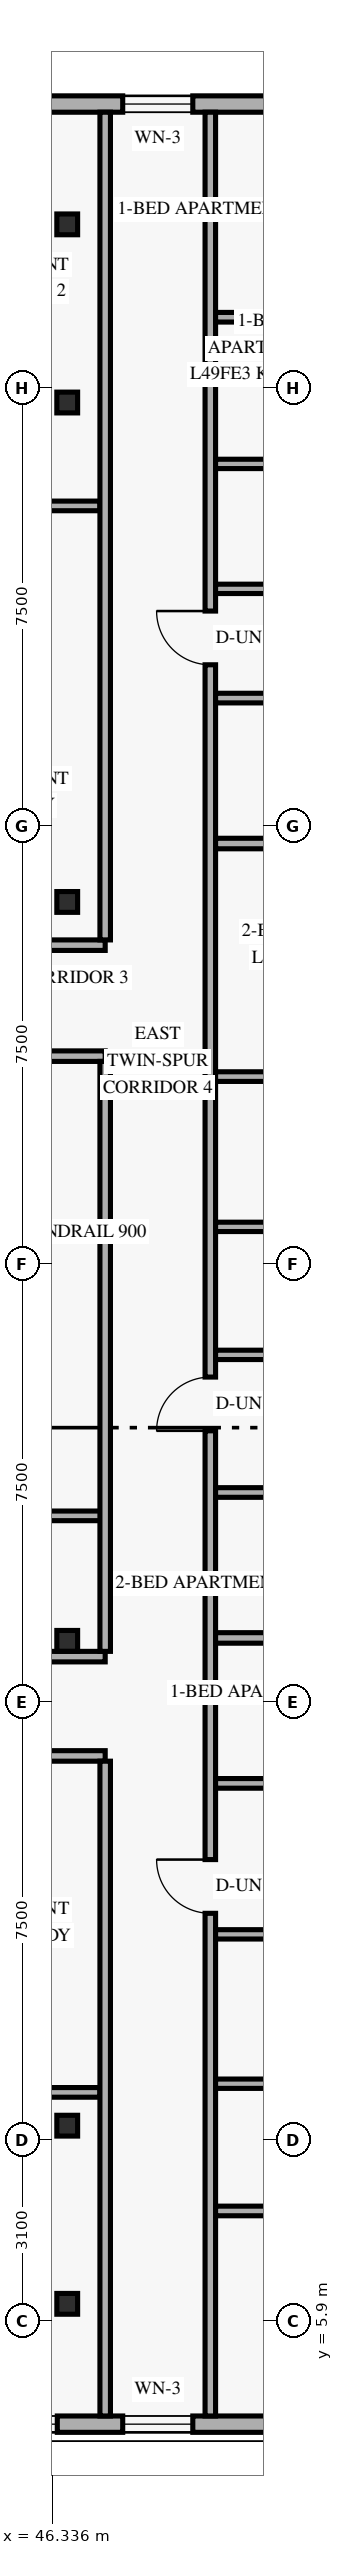
"""IFC4 building model, lengths in metres.
Left out: names, types, materials, properties, quantities, classifications, styles, units other than length and angle.
Written with IfcOpenShell. Run it as: python <this file> out.ifc"""

import sys

from ifc_helpers import new_model, si_unit, direction, frame, frame_2d, origin, origin_2d, place, context, subcontext, project, spatial, rectangle, hollow_rectangle, extrude, element, fill, save


model = new_model("IFC4")
c1 = context("Model", 3, precision=1e-05, world=origin(), true_north=direction((0.0, 1.0)))
c2 = subcontext(c1, "Body", "Model", "MODEL_VIEW")
j1 = project(units=[si_unit("LENGTHUNIT", "METRE"), si_unit("PLANEANGLEUNIT", "RADIAN")], contexts=[c1])
p1 = place(None, origin())
s1 = spatial("IfcSite", under=j1, at=p1, CompositionType="ELEMENT")
p2 = place(p1, origin())
s2 = spatial("IfcBuilding", under=s1, at=p2, CompositionType="ELEMENT")
p3 = place(p2, frame((0.0, 0.0, 188.4)))
s3 = spatial("IfcBuildingStorey", under=s2, at=p3, CompositionType="ELEMENT", Elevation=188.4)
for number, where, z_axis, x_axis in (
    (1, (46.53, 6.2, 0.0), (0.035, 0.0, 0.999), (0.0, 1.0, 0.0)),
    (2, (46.53, 9.25, 0.0), (0.035, 0.0, 0.999), (0.0, 1.0, 0.0)),
    (3, (46.53, 17.55, 0.0), (0.035, 0.0, 0.999), (0.0, 1.0, 0.0)),
    (4, (46.53, 30.2, 0.0), (0.035, 0.0, 0.999), (0.0, 1.0, 0.0)),
    (5, (46.53, 38.75, 0.0), (0.035, 0.0, 0.999), (0.0, 1.0, 0.0)),
    (6, (46.53, 41.8, 0.0), (0.035, 0.0, 0.999), (0.0, 1.0, 0.0)),
):
    element("IfcColumn", number, at=place(p3, frame(where, z_axis=z_axis, x_axis=x_axis)), inside=s3, PredefinedType="COLUMN", context=c2, shape_type="SweptSolid", body=[
        extrude(hollow_rectangle(XDim=0.356, YDim=0.356, WallThickness=0.016, at=origin_2d()), origin(), (0.0, 0.0, 1.0), 3.602),
    ])
p4 = place(p3, frame((34.4, 4.14, 0.0), z_axis=(0.0, 0.0, 1.0), x_axis=(1.0, 0.0, 0.0)))
e7 = element("IfcWall", 7, at=p4, inside=s3, PredefinedType="SOLIDWALL", context=c2, shape_type="SweptSolid", body=[
    extrude(rectangle(XDim=20.58, YDim=0.28, at=frame_2d((10.29, 0.0))), origin(), (0.0, 0.0, 1.0), 3.35),
])
p5 = place(p4, frame((1.535, 0.0, 0.85)))
e8 = element("IfcOpeningElement", 8, at=p5, cuts=e7, PredefinedType="OPENING", context=c2, shape_type="SweptSolid", body=[
    extrude(rectangle(XDim=1.5, YDim=1.55, at=frame_2d((0.75, 0.775))), frame((0.0, 0.15, 0.0), z_axis=(0.0, -1.0, 0.0), x_axis=(1.0, 0.0, 0.0)), (0.0, 0.0, 1.0), 0.3),
])
p6 = place(p4, frame((5.876, 0.0, 0.85)))
e9 = element("IfcOpeningElement", 9, at=p6, cuts=e7, PredefinedType="OPENING", context=c2, shape_type="SweptSolid", body=[
    extrude(rectangle(XDim=1.5, YDim=1.55, at=frame_2d((0.75, 0.775))), frame((0.0, 0.15, 0.0), z_axis=(0.0, -1.0, 0.0), x_axis=(1.0, 0.0, 0.0)), (0.0, 0.0, 1.0), 0.3),
])
p7 = place(p4, frame((10.523, 0.0, 0.85)))
e10 = element("IfcOpeningElement", 10, at=p7, cuts=e7, PredefinedType="OPENING", context=c2, shape_type="SweptSolid", body=[
    extrude(rectangle(XDim=1.5, YDim=1.55, at=frame_2d((0.75, 0.775))), frame((0.0, 0.15, 0.0), z_axis=(0.0, -1.0, 0.0), x_axis=(1.0, 0.0, 0.0)), (0.0, 0.0, 1.0), 0.3),
])
p8 = place(p4, frame((13.143, 0.0, 0.85)))
e11 = element("IfcOpeningElement", 11, at=p8, cuts=e7, PredefinedType="OPENING", context=c2, shape_type="SweptSolid", body=[
    extrude(rectangle(XDim=1.2, YDim=1.5, at=frame_2d((0.6, 0.75))), frame((0.0, 0.15, 0.0), z_axis=(0.0, -1.0, 0.0), x_axis=(1.0, 0.0, 0.0)), (0.0, 0.0, 1.0), 0.3),
])
p9 = place(p4, frame((16.862, 0.0, 0.85)))
e12 = element("IfcOpeningElement", 12, at=p9, cuts=e7, PredefinedType="OPENING", context=c2, shape_type="SweptSolid", body=[
    extrude(rectangle(XDim=1.5, YDim=1.55, at=frame_2d((0.75, 0.775))), frame((0.0, 0.15, 0.0), z_axis=(0.0, -1.0, 0.0), x_axis=(1.0, 0.0, 0.0)), (0.0, 0.0, 1.0), 0.3),
])
p10 = place(p3, frame((54.98, 43.86, 0.0), z_axis=(0.0, 0.0, 1.0), x_axis=(-1.0, 0.0, 0.0)))
e13 = element("IfcWall", 13, at=p10, inside=s3, PredefinedType="SOLIDWALL", context=c2, shape_type="SweptSolid", body=[
    extrude(rectangle(XDim=33.76, YDim=0.28, at=frame_2d((16.88, 0.0))), origin(), (0.0, 0.0, 1.0), 3.35),
])
p11 = place(p10, frame((28.705, 0.0, 0.85)))
e14 = element("IfcOpeningElement", 14, at=p11, cuts=e13, PredefinedType="OPENING", context=c2, shape_type="SweptSolid", body=[
    extrude(rectangle(XDim=1.35, YDim=1.55, at=frame_2d((0.675, 0.775))), frame((0.0, 0.15, 0.0), z_axis=(0.0, -1.0, 0.0), x_axis=(1.0, 0.0, 0.0)), (0.0, 0.0, 1.0), 0.3),
])
p12 = place(p10, frame((21.82, 0.0, 0.85)))
e15 = element("IfcOpeningElement", 15, at=p12, cuts=e13, PredefinedType="OPENING", context=c2, shape_type="SweptSolid", body=[
    extrude(rectangle(XDim=1.35, YDim=1.55, at=frame_2d((0.675, 0.775))), frame((0.0, 0.15, 0.0), z_axis=(0.0, -1.0, 0.0), x_axis=(1.0, 0.0, 0.0)), (0.0, 0.0, 1.0), 0.3),
])
p13 = place(p10, frame((15.043, 0.0, 0.85)))
e16 = element("IfcOpeningElement", 16, at=p13, cuts=e13, PredefinedType="OPENING", context=c2, shape_type="SweptSolid", body=[
    extrude(rectangle(XDim=1.35, YDim=1.55, at=frame_2d((0.675, 0.775))), frame((0.0, 0.15, 0.0), z_axis=(0.0, -1.0, 0.0), x_axis=(1.0, 0.0, 0.0)), (0.0, 0.0, 1.0), 0.3),
])
p14 = place(p10, frame((9.132, 0.0, 0.85)))
e17 = element("IfcOpeningElement", 17, at=p14, cuts=e13, PredefinedType="OPENING", context=c2, shape_type="SweptSolid", body=[
    extrude(rectangle(XDim=1.35, YDim=1.55, at=frame_2d((0.675, 0.775))), frame((0.0, 0.15, 0.0), z_axis=(0.0, -1.0, 0.0), x_axis=(1.0, 0.0, 0.0)), (0.0, 0.0, 1.0), 0.3),
])
p15 = place(p10, frame((6.237, 0.0, 0.85)))
e18 = element("IfcOpeningElement", 18, at=p15, cuts=e13, PredefinedType="OPENING", context=c2, shape_type="SweptSolid", body=[
    extrude(rectangle(XDim=1.2, YDim=1.5, at=frame_2d((0.6, 0.75))), frame((0.0, 0.15, 0.0), z_axis=(0.0, -1.0, 0.0), x_axis=(1.0, 0.0, 0.0)), (0.0, 0.0, 1.0), 0.3),
])
p16 = place(p10, frame((2.293, 0.0, 0.85)))
e19 = element("IfcOpeningElement", 19, at=p16, cuts=e13, PredefinedType="OPENING", context=c2, shape_type="SweptSolid", body=[
    extrude(rectangle(XDim=1.35, YDim=1.55, at=frame_2d((0.675, 0.775))), frame((0.0, 0.15, 0.0), z_axis=(0.0, -1.0, 0.0), x_axis=(1.0, 0.0, 0.0)), (0.0, 0.0, 1.0), 0.3),
])
p17 = place(p3, frame((38.032, 15.58, 0.0), z_axis=(0.0, 0.0, 1.0), x_axis=(1.0, 0.0, 0.0)))
e20 = element("IfcWall", 20, at=p17, inside=s3, PredefinedType="STANDARD", context=c2, shape_type="SweptSolid", body=[
    extrude(rectangle(XDim=9.21, YDim=0.18, at=frame_2d((4.605, 0.0))), origin(), (0.0, 0.0, 1.0), 2.72),
])
p18 = place(p17, frame((0.327, 0.0, 0.0)))
e21 = element("IfcOpeningElement", 21, at=p18, cuts=e20, PredefinedType="OPENING", context=c2, shape_type="SweptSolid", body=[
    extrude(rectangle(XDim=0.92, YDim=2.15, at=frame_2d((0.46, 1.075))), frame((0.0, 0.1, 0.0), z_axis=(0.0, -1.0, 0.0), x_axis=(1.0, 0.0, 0.0)), (0.0, 0.0, 1.0), 0.2),
])
p19 = place(p3, frame((37.64, 17.28, 0.0), z_axis=(0.0, 0.0, 1.0), x_axis=(1.0, 0.0, 0.0)))
e22 = element("IfcWall", 22, at=p19, inside=s3, PredefinedType="STANDARD", context=c2, shape_type="SweptSolid", body=[
    extrude(rectangle(XDim=9.603, YDim=0.18, at=frame_2d((4.802, 0.0))), origin(), (0.0, 0.0, 1.0), 2.72),
])
p20 = place(p19, frame((1.31, 0.0, 0.0)))
e23 = element("IfcOpeningElement", 23, at=p20, cuts=e22, PredefinedType="OPENING", context=c2, shape_type="SweptSolid", body=[
    extrude(rectangle(XDim=0.95, YDim=2.15, at=frame_2d((0.475, 1.075))), frame((0.0, 0.1, 0.0), z_axis=(0.0, -1.0, 0.0), x_axis=(1.0, 0.0, 0.0)), (0.0, 0.0, 1.0), 0.2),
])
p21 = place(p3, frame((45.48, 27.56, 0.0), z_axis=(0.0, 0.0, 1.0), x_axis=(1.0, 0.0, 0.0)))
e24 = element("IfcWall", 24, at=p21, inside=s3, PredefinedType="STANDARD", context=c2, shape_type="SweptSolid", body=[
    extrude(rectangle(XDim=1.763, YDim=0.18, at=frame_2d((0.881, 0.0))), origin(), (0.0, 0.0, 1.0), 2.72),
])
p22 = place(p3, frame((35.51, 29.46, 0.0), z_axis=(0.0, 0.0, 1.0), x_axis=(1.0, 0.0, 0.0)))
e25 = element("IfcWall", 25, at=p22, inside=s3, PredefinedType="STANDARD", context=c2, shape_type="SweptSolid", body=[
    extrude(rectangle(XDim=11.733, YDim=0.18, at=frame_2d((5.866, 0.0))), origin(), (0.0, 0.0, 1.0), 2.72),
])
p23 = place(p22, frame((0.32, 0.0, 0.0)))
e26 = element("IfcOpeningElement", 26, at=p23, cuts=e25, PredefinedType="OPENING", context=c2, shape_type="SweptSolid", body=[
    extrude(rectangle(XDim=0.92, YDim=2.15, at=frame_2d((0.46, 1.075))), frame((0.0, 0.1, 0.0), z_axis=(0.0, -1.0, 0.0), x_axis=(1.0, 0.0, 0.0)), (0.0, 0.0, 1.0), 0.2),
])
p24 = place(p3, frame((44.183, 9.82, 0.0), z_axis=(0.0, 0.0, 1.0), x_axis=(1.0, 0.0, 0.0)))
e27 = element("IfcWall", 27, at=p24, inside=s3, PredefinedType="PARTITIONING", context=c2, shape_type="SweptSolid", body=[
    extrude(rectangle(XDim=2.97, YDim=0.165, at=frame_2d((1.485, 0.0))), origin(), (0.0, 0.0, 1.0), 2.72),
])
p25 = place(p3, frame((43.183, 36.98, 0.0), z_axis=(0.0, 0.0, 1.0), x_axis=(1.0, 0.0, 0.0)))
e28 = element("IfcWall", 28, at=p25, inside=s3, PredefinedType="PARTITIONING", context=c2, shape_type="SweptSolid", body=[
    extrude(rectangle(XDim=3.97, YDim=0.165, at=frame_2d((1.985, 0.0))), origin(), (0.0, 0.0, 1.0), 2.72),
])
p26 = place(p3, frame((45.48, 19.69, 0.0), z_axis=(0.0, 0.0, 1.0), x_axis=(1.0, 0.0, 0.0)))
e29 = element("IfcWall", 29, at=p26, inside=s3, PredefinedType="PARTITIONING", context=c2, shape_type="SweptSolid", body=[
    extrude(rectangle(XDim=1.763, YDim=0.165, at=frame_2d((0.881, 0.0))), origin(), (0.0, 0.0, 1.0), 2.72),
])
p27 = place(p3, frame((49.043, 4.28, 0.0), z_axis=(0.0, 0.0, 1.0), x_axis=(0.0, 1.0, 0.0)))
e30 = element("IfcWall", 30, at=p27, inside=s3, PredefinedType="STANDARD", context=c2, shape_type="SweptSolid", body=[
    extrude(rectangle(XDim=39.44, YDim=0.18, at=frame_2d((19.72, 0.0))), origin(), (0.0, 0.0, 1.0), 2.72),
])
p28 = place(p27, frame((8.605, 0.0, 0.0)))
e31 = element("IfcOpeningElement", 31, at=p28, cuts=e30, PredefinedType="OPENING", context=c2, shape_type="SweptSolid", body=[
    extrude(rectangle(XDim=0.92, YDim=2.15, at=frame_2d((0.46, 1.075))), frame((0.0, 0.1, 0.0), z_axis=(0.0, -1.0, 0.0), x_axis=(1.0, 0.0, 0.0)), (0.0, 0.0, 1.0), 0.2),
])
p29 = place(p27, frame((16.866, 0.0, 0.0)))
e32 = element("IfcOpeningElement", 32, at=p29, cuts=e30, PredefinedType="OPENING", context=c2, shape_type="SweptSolid", body=[
    extrude(rectangle(XDim=0.92, YDim=2.15, at=frame_2d((0.46, 1.075))), frame((0.0, 0.1, 0.0), z_axis=(0.0, -1.0, 0.0), x_axis=(1.0, 0.0, 0.0)), (0.0, 0.0, 1.0), 0.2),
])
p30 = place(p27, frame((29.98, 0.0, 0.0)))
e33 = element("IfcOpeningElement", 33, at=p30, cuts=e30, PredefinedType="OPENING", context=c2, shape_type="SweptSolid", body=[
    extrude(rectangle(XDim=0.92, YDim=2.15, at=frame_2d((0.46, 1.075))), frame((0.0, 0.1, 0.0), z_axis=(0.0, -1.0, 0.0), x_axis=(1.0, 0.0, 0.0)), (0.0, 0.0, 1.0), 0.2),
])
p31 = place(p3, frame((47.243, 4.28, 0.0), z_axis=(0.0, 0.0, 1.0), x_axis=(0.0, 1.0, 0.0)))
e34 = element("IfcWall", 34, at=p31, inside=s3, PredefinedType="STANDARD", context=c2, shape_type="SweptSolid", body=[
    extrude(rectangle(XDim=11.21, YDim=0.18, at=frame_2d((5.605, 0.0))), origin(), (0.0, 0.0, 1.0), 2.72),
])
p32 = place(p3, frame((47.243, 17.37, 0.0), z_axis=(0.0, 0.0, 1.0), x_axis=(0.0, 1.0, 0.0)))
e35 = element("IfcWall", 35, at=p32, inside=s3, PredefinedType="STANDARD", context=c2, shape_type="SweptSolid", body=[
    extrude(rectangle(XDim=10.1, YDim=0.18, at=frame_2d((5.05, 0.0))), origin(), (0.0, 0.0, 1.0), 2.72),
])
p33 = place(p3, frame((47.243, 29.55, 0.0), z_axis=(0.0, 0.0, 1.0), x_axis=(0.0, 1.0, 0.0)))
e36 = element("IfcWall", 36, at=p33, inside=s3, PredefinedType="STANDARD", context=c2, shape_type="SweptSolid", body=[
    extrude(rectangle(XDim=14.17, YDim=0.18, at=frame_2d((7.085, 0.0))), origin(), (0.0, 0.0, 1.0), 2.72),
])
p34 = place(p3, frame((49.133, 7.79, 0.0), z_axis=(0.0, 0.0, 1.0), x_axis=(1.0, 0.0, 0.0)))
e37 = element("IfcWall", 37, at=p34, inside=s3, PredefinedType="PARTITIONING", context=c2, shape_type="SweptSolid", body=[
    extrude(rectangle(XDim=9.187, YDim=0.165, at=frame_2d((4.594, 0.0))), origin(), (0.0, 0.0, 1.0), 2.869),
])
p35 = place(p34, frame((5.653, 0.0, 0.0)))
e38 = element("IfcOpeningElement", 38, at=p35, cuts=e37, PredefinedType="OPENING", context=c2, shape_type="SweptSolid", body=[
    extrude(rectangle(XDim=0.9, YDim=2.14, at=frame_2d((0.45, 1.07))), frame((0.0, 0.093, 0.0), z_axis=(0.0, -1.0, 0.0), x_axis=(1.0, 0.0, 0.0)), (0.0, 0.0, 1.0), 0.185),
])
p36 = place(p3, frame((49.133, 12.525, 0.0), z_axis=(0.0, 0.0, 1.0), x_axis=(1.0, 0.0, 0.0)))
e39 = element("IfcWall", 39, at=p36, inside=s3, PredefinedType="PLUMBINGWALL", context=c2, shape_type="SweptSolid", body=[
    extrude(rectangle(XDim=2.788, YDim=0.16, at=frame_2d((1.394, 0.0))), origin(), (0.0, 0.0, 1.0), 3.35),
])
p37 = place(p3, frame((49.133, 9.968, 0.0), z_axis=(0.0, 0.0, 1.0), x_axis=(1.0, 0.0, 0.0)))
e40 = element("IfcWall", 40, at=p37, inside=s3, PredefinedType="PLUMBINGWALL", context=c2, shape_type="SweptSolid", body=[
    extrude(rectangle(XDim=2.628, YDim=0.16, at=frame_2d((1.314, 0.0))), origin(), (0.0, 0.0, 1.0), 3.35),
])
p38 = place(p3, frame((49.133, 15.11, 0.0), z_axis=(0.0, 0.0, 1.0), x_axis=(1.0, 0.0, 0.0)))
e41 = element("IfcWall", 41, at=p38, inside=s3, PredefinedType="PARTITIONING", context=c2, shape_type="SweptSolid", body=[
    extrude(rectangle(XDim=9.187, YDim=0.165, at=frame_2d((4.594, 0.0))), origin(), (0.0, 0.0, 1.0), 2.869),
])
p39 = place(p38, frame((4.569, 0.0, 0.0)))
e42 = element("IfcOpeningElement", 42, at=p39, cuts=e41, PredefinedType="OPENING", context=c2, shape_type="SweptSolid", body=[
    extrude(rectangle(XDim=0.95, YDim=2.15, at=frame_2d((0.475, 1.075))), frame((0.0, 0.093, 0.0), z_axis=(0.0, -1.0, 0.0), x_axis=(1.0, 0.0, 0.0)), (0.0, 0.0, 1.0), 0.185),
])
p40 = place(p3, frame((49.133, 17.6, 0.0), z_axis=(0.0, 0.0, 1.0), x_axis=(1.0, 0.0, 0.0)))
e43 = element("IfcWall", 43, at=p40, inside=s3, PredefinedType="PARTITIONING", context=c2, shape_type="SweptSolid", body=[
    extrude(rectangle(XDim=9.187, YDim=0.18, at=frame_2d((4.594, 0.0))), origin(), (0.0, 0.0, 1.0), 2.72),
])
p41 = place(p3, frame((49.133, 27.21, 0.0), z_axis=(0.0, 0.0, 1.0), x_axis=(1.0, 0.0, 0.0)))
e44 = element("IfcWall", 44, at=p41, inside=s3, PredefinedType="PARTITIONING", context=c2, shape_type="SweptSolid", body=[
    extrude(rectangle(XDim=9.187, YDim=0.165, at=frame_2d((4.594, 0.0))), origin(), (0.0, 0.0, 1.0), 2.869),
])
p42 = place(p41, frame((3.419, 0.0, 0.0)))
e45 = element("IfcOpeningElement", 45, at=p42, cuts=e44, PredefinedType="OPENING", context=c2, shape_type="SweptSolid", body=[
    extrude(rectangle(XDim=0.88, YDim=2.14, at=frame_2d((0.44, 1.07))), frame((0.0, 0.093, 0.0), z_axis=(0.0, -1.0, 0.0), x_axis=(1.0, 0.0, 0.0)), (0.0, 0.0, 1.0), 0.185),
])
p43 = place(p41, frame((6.686, 0.0, 0.0)))
e46 = element("IfcOpeningElement", 46, at=p43, cuts=e44, PredefinedType="OPENING", context=c2, shape_type="SweptSolid", body=[
    extrude(rectangle(XDim=0.88, YDim=2.14, at=frame_2d((0.44, 1.07))), frame((0.0, 0.093, 0.0), z_axis=(0.0, -1.0, 0.0), x_axis=(1.0, 0.0, 0.0)), (0.0, 0.0, 1.0), 0.185),
])
p44 = place(p3, frame((49.133, 22.446, 0.0), z_axis=(0.0, 0.0, 1.0), x_axis=(1.0, 0.0, 0.0)))
e47 = element("IfcWall", 47, at=p44, inside=s3, PredefinedType="PLUMBINGWALL", context=c2, shape_type="SweptSolid", body=[
    extrude(rectangle(XDim=2.864, YDim=0.16, at=frame_2d((1.432, 0.0))), origin(), (0.0, 0.0, 1.0), 3.35),
])
p45 = place(p3, frame((49.133, 24.637, 0.0), z_axis=(0.0, 0.0, 1.0), x_axis=(1.0, 0.0, 0.0)))
e48 = element("IfcWall", 48, at=p45, inside=s3, PredefinedType="PLUMBINGWALL", context=c2, shape_type="SweptSolid", body=[
    extrude(rectangle(XDim=2.704, YDim=0.16, at=frame_2d((1.352, 0.0))), origin(), (0.0, 0.0, 1.0), 3.35),
])
p46 = place(p3, frame((49.133, 20.09, 0.0), z_axis=(0.0, 0.0, 1.0), x_axis=(1.0, 0.0, 0.0)))
e49 = element("IfcWall", 49, at=p46, inside=s3, PredefinedType="PARTITIONING", context=c2, shape_type="SweptSolid", body=[
    extrude(rectangle(XDim=9.187, YDim=0.165, at=frame_2d((4.594, 0.0))), origin(), (0.0, 0.0, 1.0), 2.869),
])
p47 = place(p46, frame((4.569, 0.0, 0.0)))
e50 = element("IfcOpeningElement", 50, at=p47, cuts=e49, PredefinedType="OPENING", context=c2, shape_type="SweptSolid", body=[
    extrude(rectangle(XDim=0.95, YDim=2.15, at=frame_2d((0.475, 1.075))), frame((0.0, 0.093, 0.0), z_axis=(0.0, -1.0, 0.0), x_axis=(1.0, 0.0, 0.0)), (0.0, 0.0, 1.0), 0.185),
])
p48 = place(p3, frame((49.133, 31.2, 0.0), z_axis=(0.0, 0.0, 1.0), x_axis=(1.0, 0.0, 0.0)))
e51 = element("IfcWall", 51, at=p48, inside=s3, PredefinedType="PARTITIONING", context=c2, shape_type="SweptSolid", body=[
    extrude(rectangle(XDim=9.187, YDim=0.18, at=frame_2d((4.594, 0.0))), origin(), (0.0, 0.0, 1.0), 2.869),
])
p49 = place(p3, frame((49.133, 40.21, 0.0), z_axis=(0.0, 0.0, 1.0), x_axis=(1.0, 0.0, 0.0)))
e52 = element("IfcWall", 52, at=p49, inside=s3, PredefinedType="PARTITIONING", context=c2, shape_type="SweptSolid", body=[
    extrude(rectangle(XDim=9.187, YDim=0.165, at=frame_2d((4.594, 0.0))), origin(), (0.0, 0.0, 1.0), 2.869),
])
p50 = place(p49, frame((5.539, 0.0, 0.0)))
e53 = element("IfcOpeningElement", 53, at=p50, cuts=e52, PredefinedType="OPENING", context=c2, shape_type="SweptSolid", body=[
    extrude(rectangle(XDim=0.9, YDim=2.14, at=frame_2d((0.45, 1.07))), frame((0.0, 0.093, 0.0), z_axis=(0.0, -1.0, 0.0), x_axis=(1.0, 0.0, 0.0)), (0.0, 0.0, 1.0), 0.185),
])
p51 = place(p3, frame((49.133, 35.56, 0.0), z_axis=(0.0, 0.0, 1.0), x_axis=(1.0, 0.0, 0.0)))
e54 = element("IfcWall", 54, at=p51, inside=s3, PredefinedType="PLUMBINGWALL", context=c2, shape_type="SweptSolid", body=[
    extrude(rectangle(XDim=2.56, YDim=0.16, at=frame_2d((1.28, 0.0))), origin(), (0.0, 0.0, 1.0), 3.35),
])
p52 = place(p3, frame((49.133, 37.699, 0.0), z_axis=(0.0, 0.0, 1.0), x_axis=(1.0, 0.0, 0.0)))
e55 = element("IfcWall", 55, at=p52, inside=s3, PredefinedType="PLUMBINGWALL", context=c2, shape_type="SweptSolid", body=[
    extrude(rectangle(XDim=2.4, YDim=0.16, at=frame_2d((1.2, 0.0))), origin(), (0.0, 0.0, 1.0), 3.35),
])
p53 = place(p3, frame((49.133, 33.69, 0.0), z_axis=(0.0, 0.0, 1.0), x_axis=(1.0, 0.0, 0.0)))
e56 = element("IfcWall", 56, at=p53, inside=s3, PredefinedType="PARTITIONING", context=c2, shape_type="SweptSolid", body=[
    extrude(rectangle(XDim=9.187, YDim=0.165, at=frame_2d((4.594, 0.0))), origin(), (0.0, 0.0, 1.0), 2.869),
])
p54 = place(p53, frame((4.569, 0.0, 0.0)))
e57 = element("IfcOpeningElement", 57, at=p54, cuts=e56, PredefinedType="OPENING", context=c2, shape_type="SweptSolid", body=[
    extrude(rectangle(XDim=0.95, YDim=2.15, at=frame_2d((0.475, 1.075))), frame((0.0, 0.093, 0.0), z_axis=(0.0, -1.0, 0.0), x_axis=(1.0, 0.0, 0.0)), (0.0, 0.0, 1.0), 0.185),
])
p55 = place(p7, origin())
e58 = element("IfcWindow", 58, at=p55, inside=s3, PartitioningType="SINGLE_PANEL", PredefinedType="WINDOW", context=c2, shape_type="SweptSolid", body=[
    extrude(rectangle(XDim=1.5, YDim=1.55, at=frame_2d((0.75, 0.775))), frame((0.0, 0.03, 0.0), z_axis=(0.0, -1.0, 0.0), x_axis=(1.0, 0.0, 0.0)), (0.0, 0.0, 1.0), 0.06),
])
fill(e10, e58)
p56 = place(p8, origin())
e59 = element("IfcWindow", 59, at=p56, inside=s3, PartitioningType="SINGLE_PANEL", PredefinedType="WINDOW", context=c2, shape_type="SweptSolid", body=[
    extrude(rectangle(XDim=1.2, YDim=1.5, at=frame_2d((0.6, 0.75))), frame((0.0, 0.03, 0.0), z_axis=(0.0, -1.0, 0.0), x_axis=(1.0, 0.0, 0.0)), (0.0, 0.0, 1.0), 0.06),
])
fill(e11, e59)
p57 = place(p15, origin())
e60 = element("IfcWindow", 60, at=p57, inside=s3, PartitioningType="SINGLE_PANEL", PredefinedType="WINDOW", context=c2, shape_type="SweptSolid", body=[
    extrude(rectangle(XDim=1.2, YDim=1.5, at=frame_2d((0.6, 0.75))), frame((0.0, 0.03, 0.0), z_axis=(0.0, -1.0, 0.0), x_axis=(1.0, 0.0, 0.0)), (0.0, 0.0, 1.0), 0.06),
])
fill(e18, e60)
p58 = place(p28, origin())
e61 = element("IfcDoor", 61, at=p58, inside=s3, OperationType="SINGLE_SWING_RIGHT", PredefinedType="DOOR", context=c2, shape_type="SweptSolid", body=[
    extrude(rectangle(XDim=0.92, YDim=2.15, at=frame_2d((0.46, 1.075))), frame((0.0, 0.025, 0.0), z_axis=(0.0, -1.0, 0.0), x_axis=(1.0, 0.0, 0.0)), (0.0, 0.0, 1.0), 0.05),
])
fill(e31, e61)
p59 = place(p29, origin())
e62 = element("IfcDoor", 62, at=p59, inside=s3, OperationType="SINGLE_SWING_LEFT", PredefinedType="DOOR", context=c2, shape_type="SweptSolid", body=[
    extrude(rectangle(XDim=0.92, YDim=2.15, at=frame_2d((0.46, 1.075))), frame((0.0, 0.025, 0.0), z_axis=(0.0, -1.0, 0.0), x_axis=(1.0, 0.0, 0.0)), (0.0, 0.0, 1.0), 0.05),
])
fill(e32, e62)
p60 = place(p30, origin())
e63 = element("IfcDoor", 63, at=p60, inside=s3, OperationType="SINGLE_SWING_RIGHT", PredefinedType="DOOR", context=c2, shape_type="SweptSolid", body=[
    extrude(rectangle(XDim=0.92, YDim=2.15, at=frame_2d((0.46, 1.075))), frame((0.0, 0.025, 0.0), z_axis=(0.0, -1.0, 0.0), x_axis=(1.0, 0.0, 0.0)), (0.0, 0.0, 1.0), 0.05),
])
fill(e33, e63)
save(model, sys.argv[1])
